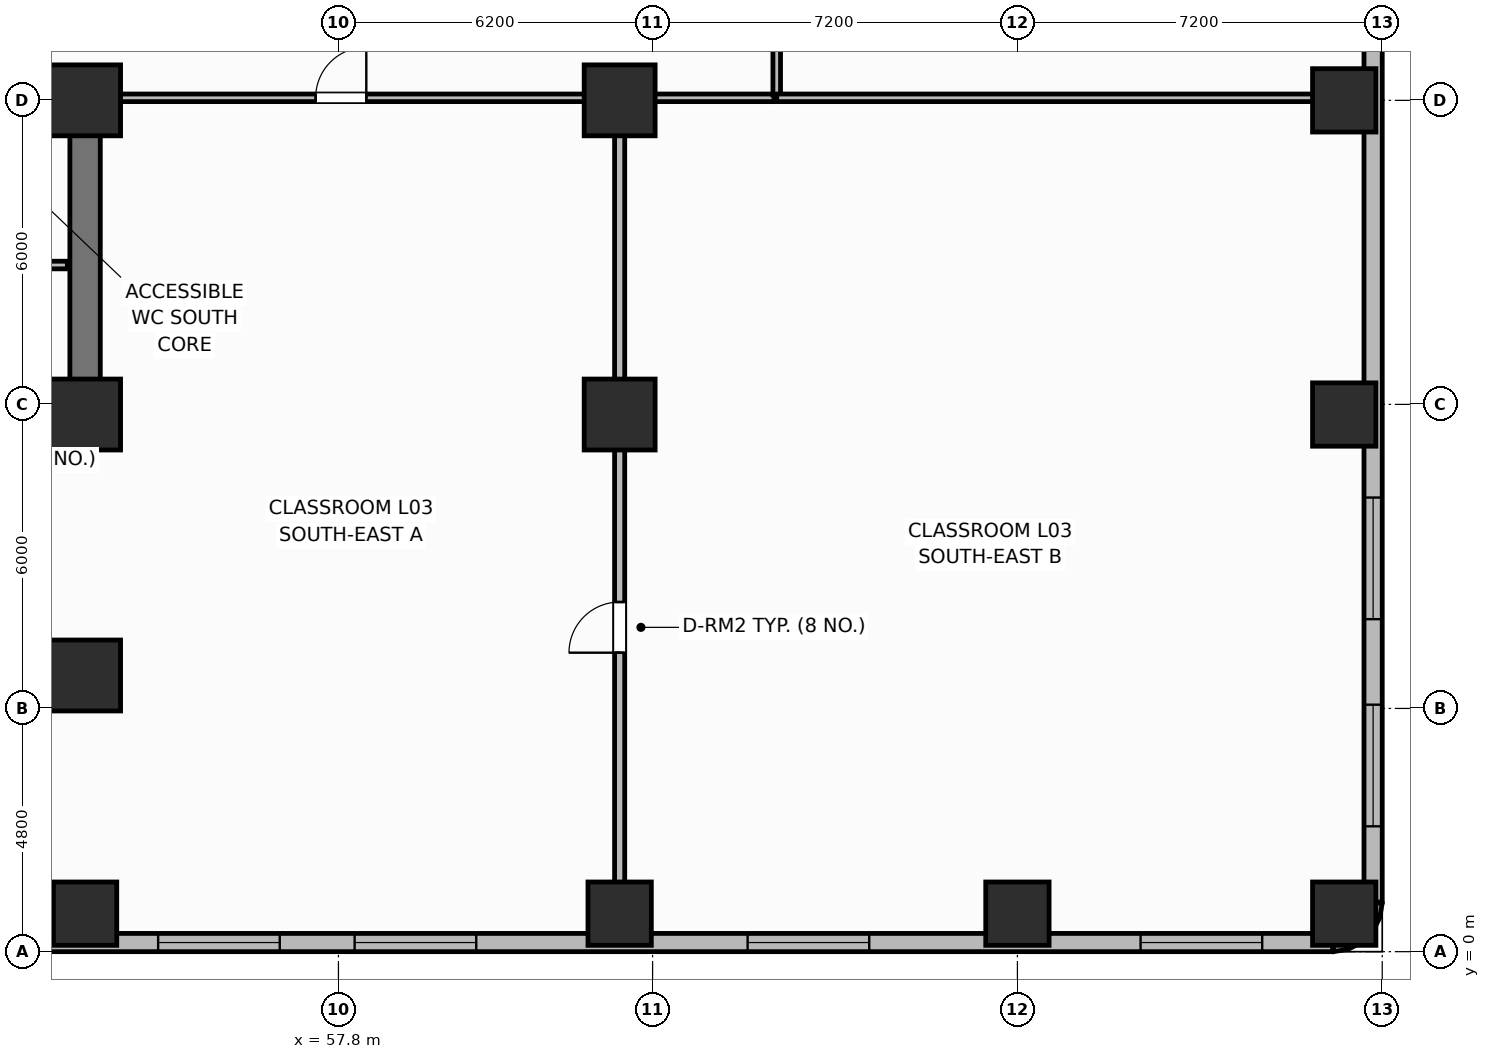
"""IFC4 building model, lengths in metres.
Left out: names, types, materials, properties, quantities, classifications, styles, units other than length and angle.
Written with IfcOpenShell. Run it as: python <this file> out.ifc"""

import sys

from ifc_helpers import new_model, si_unit, direction, frame, frame_2d, origin, origin_2d, place, context, subcontext, project, spatial, rectangle, extrude, element, fill, save


model = new_model("IFC4")
c1 = context("Model", 3, precision=1e-05, world=origin(), true_north=direction((0.0, 1.0)))
c2 = subcontext(c1, "Body", "Model", "MODEL_VIEW")
j1 = project(units=[si_unit("LENGTHUNIT", "METRE"), si_unit("PLANEANGLEUNIT", "RADIAN")], contexts=[c1])
p1 = place(None, origin())
s1 = spatial("IfcSite", under=j1, at=p1, CompositionType="ELEMENT")
p2 = place(p1, origin())
s2 = spatial("IfcBuilding", under=s1, at=p2, CompositionType="ELEMENT")
p3 = place(p2, frame((0.0, 0.0, 15.6)))
s3 = spatial("IfcBuildingStorey", under=s2, at=p3, CompositionType="ELEMENT", Elevation=15.6)
p4 = place(p3, frame((52.8, 10.6, 0.0), z_axis=(0.0, 0.0, 1.0), x_axis=(-1.0, 0.0, 0.0)))
e1 = element("IfcWall", 1, at=p4, inside=s3, PredefinedType="SHEAR", context=c2, shape_type="SweptSolid", body=[
    extrude(rectangle(XDim=27.2, YDim=0.6, at=frame_2d((13.6, 0.0))), origin(), (0.0, 0.0, 1.0), 4.5),
])
p5 = place(p3, frame((52.8, 10.9, 0.0), z_axis=(0.0, 0.0, 1.0), x_axis=(0.0, 1.0, 0.0)))
e2 = element("IfcWall", 2, at=p5, inside=s3, PredefinedType="SHEAR", context=c2, shape_type="SweptSolid", body=[
    extrude(rectangle(XDim=5.6, YDim=0.6, at=frame_2d((2.8, 0.0))), origin(), (0.0, 0.0, 1.0), 4.5),
])
p6 = place(p3, frame((25.6, 16.8, 0.0), z_axis=(0.0, 0.0, 1.0), x_axis=(1.0, 0.0, 0.0)))
e3 = element("IfcWall", 3, at=p6, inside=s3, PredefinedType="SHEAR", context=c2, shape_type="SweptSolid", body=[
    extrude(rectangle(XDim=27.2, YDim=0.6, at=frame_2d((13.6, 0.0))), origin(), (0.0, 0.0, 1.0), 4.5),
])
p7 = place(p6, frame((1.7, 0.0, 0.0)))
e4 = element("IfcOpeningElement", 4, at=p7, cuts=e3, PredefinedType="OPENING", context=c2, shape_type="SweptSolid", body=[
    extrude(rectangle(XDim=1.1, YDim=2.15, at=frame_2d((0.55, 1.075))), frame((0.0, 0.31, 0.0), z_axis=(0.0, -1.0, 0.0), x_axis=(1.0, 0.0, 0.0)), (0.0, 0.0, 1.0), 0.62),
])
p8 = place(p6, frame((4.45, 0.0, 0.0)))
e5 = element("IfcOpeningElement", 5, at=p8, cuts=e3, PredefinedType="OPENING", context=c2, shape_type="SweptSolid", body=[
    extrude(rectangle(XDim=0.85, YDim=2.1, at=frame_2d((0.425, 1.05))), frame((0.0, 0.31, 0.0), z_axis=(0.0, -1.0, 0.0), x_axis=(1.0, 0.0, 0.0)), (0.0, 0.0, 1.0), 0.62),
])
p9 = place(p6, frame((6.5, 0.0, 0.0)))
e6 = element("IfcOpeningElement", 6, at=p9, cuts=e3, PredefinedType="OPENING", context=c2, shape_type="SweptSolid", body=[
    extrude(rectangle(XDim=0.85, YDim=2.1, at=frame_2d((0.425, 1.05))), frame((0.0, 0.31, 0.0), z_axis=(0.0, -1.0, 0.0), x_axis=(1.0, 0.0, 0.0)), (0.0, 0.0, 1.0), 0.62),
])
p10 = place(p6, frame((13.0, 0.0, 0.0)))
e7 = element("IfcOpeningElement", 7, at=p10, cuts=e3, PredefinedType="OPENING", context=c2, shape_type="SweptSolid", body=[
    extrude(rectangle(XDim=1.2, YDim=2.15, at=frame_2d((0.6, 1.075))), frame((0.0, 0.31, 0.0), z_axis=(0.0, -1.0, 0.0), x_axis=(1.0, 0.0, 0.0)), (0.0, 0.0, 1.0), 0.62),
])
p11 = place(p6, frame((20.4, 0.0, 0.0)))
e8 = element("IfcOpeningElement", 8, at=p11, cuts=e3, PredefinedType="OPENING", context=c2, shape_type="SweptSolid", body=[
    extrude(rectangle(XDim=1.3, YDim=2.2, at=frame_2d((0.65, 1.1))), frame((0.0, 0.31, 0.0), z_axis=(0.0, -1.0, 0.0), x_axis=(1.0, 0.0, 0.0)), (0.0, 0.0, 1.0), 0.62),
])
p12 = place(p6, frame((24.65, 0.0, 0.0)))
e9 = element("IfcOpeningElement", 9, at=p12, cuts=e3, PredefinedType="OPENING", context=c2, shape_type="SweptSolid", body=[
    extrude(rectangle(XDim=0.85, YDim=2.1, at=frame_2d((0.425, 1.05))), frame((0.0, 0.31, 0.0), z_axis=(0.0, -1.0, 0.0), x_axis=(1.0, 0.0, 0.0)), (0.0, 0.0, 1.0), 0.62),
])
for number, where, z_axis, x_axis in (
    (10, (52.8, 10.6, 0.0), (0.0, 0.0, 1.0), (1.0, 0.0, 0.0)),
    (11, (52.8, 16.8, 0.0), (0.0, 0.0, 1.0), (1.0, 0.0, 0.0)),
):
    element("IfcColumn", number, at=place(p3, frame(where, z_axis=z_axis, x_axis=x_axis)), inside=s3, PredefinedType="COLUMN", context=c2, shape_type="SweptSolid", body=[
        extrude(rectangle(XDim=1.4, YDim=1.4, at=origin_2d()), origin(), (0.0, 0.0, 1.0), 4.5),
    ])
for number, where, z_axis, x_axis in (
    (12, (52.8, 0.75, 0.0), (0.0, 0.0, 1.0), (1.0, 0.0, 0.0)),
    (13, (63.35, 0.75, 0.0), (0.0, 0.0, 1.0), (1.0, 0.0, 0.0)),
    (14, (71.2, 0.75, 0.0), (0.0, 0.0, 1.0), (1.0, 0.0, 0.0)),
    (15, (77.65, 0.75, 0.0), (0.0, 0.0, 1.0), (1.0, 0.0, 0.0)),
    (16, (77.65, 10.6, 0.0), (0.0, 0.0, 1.0), (1.0, 0.0, 0.0)),
    (17, (77.65, 16.8, 0.0), (0.0, 0.0, 1.0), (1.0, 0.0, 0.0)),
):
    element("IfcColumn", number, at=place(p3, frame(where, z_axis=z_axis, x_axis=x_axis)), inside=s3, PredefinedType="COLUMN", context=c2, shape_type="SweptSolid", body=[
        extrude(rectangle(XDim=1.25, YDim=1.25, at=origin_2d()), origin(), (0.0, 0.0, 1.0), 4.5),
    ])
for number, where, z_axis, x_axis in (
    (18, (52.8, 5.45, 0.0), (0.0, 0.0, 1.0), (1.0, 0.0, 0.0)),
    (19, (63.35, 10.6, 0.0), (0.0, 0.0, 1.0), (1.0, 0.0, 0.0)),
    (20, (63.35, 16.8, 0.0), (0.0, 0.0, 1.0), (1.0, 0.0, 0.0)),
):
    element("IfcColumn", number, at=place(p3, frame(where, z_axis=z_axis, x_axis=x_axis)), inside=s3, PredefinedType="COLUMN", context=c2, shape_type="SweptSolid", body=[
        extrude(rectangle(XDim=1.4, YDim=1.4, at=origin_2d()), origin(), (0.0, 0.0, 1.0), 4.5),
    ])
p13 = place(p3, frame((21.83, 0.18, 0.0), z_axis=(0.0, 0.0, 1.0), x_axis=(1.0, 0.0, 0.0)))
e21 = element("IfcWall", 21, at=p13, inside=s3, PredefinedType="SOLIDWALL", context=c2, shape_type="SweptSolid", body=[
    extrude(rectangle(XDim=55.59, YDim=0.36, at=frame_2d((27.795, 0.0))), origin(), (0.0, 0.0, 1.0), 3.48),
])
p14 = place(p13, frame((5.267, 0.0, 0.85)))
e22 = element("IfcOpeningElement", 22, at=p14, cuts=e21, PredefinedType="OPENING", context=c2, shape_type="SweptSolid", body=[
    extrude(rectangle(XDim=2.4, YDim=2.25, at=frame_2d((1.2, 1.125))), frame((0.0, 0.19, 0.0), z_axis=(0.0, -1.0, 0.0), x_axis=(1.0, 0.0, 0.0)), (0.0, 0.0, 1.0), 0.38),
])
p15 = place(p13, frame((9.145, 0.0, 0.85)))
e23 = element("IfcOpeningElement", 23, at=p15, cuts=e21, PredefinedType="OPENING", context=c2, shape_type="SweptSolid", body=[
    extrude(rectangle(XDim=2.4, YDim=2.25, at=frame_2d((1.2, 1.125))), frame((0.0, 0.19, 0.0), z_axis=(0.0, -1.0, 0.0), x_axis=(1.0, 0.0, 0.0)), (0.0, 0.0, 1.0), 0.38),
])
p16 = place(p13, frame((13.022, 0.0, 0.85)))
e24 = element("IfcOpeningElement", 24, at=p16, cuts=e21, PredefinedType="OPENING", context=c2, shape_type="SweptSolid", body=[
    extrude(rectangle(XDim=2.4, YDim=2.25, at=frame_2d((1.2, 1.125))), frame((0.0, 0.19, 0.0), z_axis=(0.0, -1.0, 0.0), x_axis=(1.0, 0.0, 0.0)), (0.0, 0.0, 1.0), 0.38),
])
p17 = place(p13, frame((20.778, 0.0, 0.85)))
e25 = element("IfcOpeningElement", 25, at=p17, cuts=e21, PredefinedType="OPENING", context=c2, shape_type="SweptSolid", body=[
    extrude(rectangle(XDim=2.4, YDim=2.25, at=frame_2d((1.2, 1.125))), frame((0.0, 0.19, 0.0), z_axis=(0.0, -1.0, 0.0), x_axis=(1.0, 0.0, 0.0)), (0.0, 0.0, 1.0), 0.38),
])
p18 = place(p13, frame((24.656, 0.0, 0.85)))
e26 = element("IfcOpeningElement", 26, at=p18, cuts=e21, PredefinedType="OPENING", context=c2, shape_type="SweptSolid", body=[
    extrude(rectangle(XDim=2.4, YDim=2.25, at=frame_2d((1.2, 1.125))), frame((0.0, 0.19, 0.0), z_axis=(0.0, -1.0, 0.0), x_axis=(1.0, 0.0, 0.0)), (0.0, 0.0, 1.0), 0.38),
])
p19 = place(p13, frame((32.412, 0.0, 0.85)))
e27 = element("IfcOpeningElement", 27, at=p19, cuts=e21, PredefinedType="OPENING", context=c2, shape_type="SweptSolid", body=[
    extrude(rectangle(XDim=2.4, YDim=2.25, at=frame_2d((1.2, 1.125))), frame((0.0, 0.19, 0.0), z_axis=(0.0, -1.0, 0.0), x_axis=(1.0, 0.0, 0.0)), (0.0, 0.0, 1.0), 0.38),
])
p20 = place(p13, frame((36.29, 0.0, 0.85)))
e28 = element("IfcOpeningElement", 28, at=p20, cuts=e21, PredefinedType="OPENING", context=c2, shape_type="SweptSolid", body=[
    extrude(rectangle(XDim=2.4, YDim=2.25, at=frame_2d((1.2, 1.125))), frame((0.0, 0.19, 0.0), z_axis=(0.0, -1.0, 0.0), x_axis=(1.0, 0.0, 0.0)), (0.0, 0.0, 1.0), 0.38),
])
p21 = place(p13, frame((44.045, 0.0, 0.85)))
e29 = element("IfcOpeningElement", 29, at=p21, cuts=e21, PredefinedType="OPENING", context=c2, shape_type="SweptSolid", body=[
    extrude(rectangle(XDim=2.4, YDim=2.25, at=frame_2d((1.2, 1.125))), frame((0.0, 0.19, 0.0), z_axis=(0.0, -1.0, 0.0), x_axis=(1.0, 0.0, 0.0)), (0.0, 0.0, 1.0), 0.38),
])
p22 = place(p13, frame((51.801, 0.0, 0.85)))
e30 = element("IfcOpeningElement", 30, at=p22, cuts=e21, PredefinedType="OPENING", context=c2, shape_type="SweptSolid", body=[
    extrude(rectangle(XDim=2.4, YDim=2.25, at=frame_2d((1.2, 1.125))), frame((0.0, 0.19, 0.0), z_axis=(0.0, -1.0, 0.0), x_axis=(1.0, 0.0, 0.0)), (0.0, 0.0, 1.0), 0.38),
])
p23 = place(p3, frame((77.42, 0.18, 0.0), z_axis=(0.0, 0.0, 1.0), x_axis=(0.987604361038, 0.156963773077, 0.0)))
e31 = element("IfcWall", 31, at=p23, inside=s3, PredefinedType="SOLIDWALL", context=c2, shape_type="SweptSolid", body=[
    extrude(rectangle(XDim=0.25, YDim=0.36, at=frame_2d((0.125, 0.0))), origin(), (0.0, 0.0, 1.0), 3.48),
])
for number, where, z_axis, x_axis in (
    (32, (77.667, 0.219, 0.0), (0.0, 0.0, 1.0), (0.891, 0.454, 0.0)),
    (33, (77.89, 0.333, 0.0), (0.0, 0.0, 1.0), (0.707, 0.707, 0.0)),
):
    element("IfcWall", number, at=place(p3, frame(where, z_axis=z_axis, x_axis=x_axis)), inside=s3, PredefinedType="SOLIDWALL", context=c2, shape_type="SweptSolid", body=[
        extrude(rectangle(XDim=0.25, YDim=0.36, at=frame_2d((0.125, 0.0))), origin(), (0.0, 0.0, 1.0), 3.48),
    ])
p24 = place(p3, frame((78.067, 0.51, 0.0), z_axis=(0.0, 0.0, 1.0), x_axis=(0.454217786225, 0.89089067942, 0.0)))
e34 = element("IfcWall", 34, at=p24, inside=s3, PredefinedType="SOLIDWALL", context=c2, shape_type="SweptSolid", body=[
    extrude(rectangle(XDim=0.25, YDim=0.36, at=frame_2d((0.125, 0.0))), origin(), (0.0, 0.0, 1.0), 3.48),
])
p25 = place(p3, frame((78.181, 0.733, 0.0), z_axis=(0.0, 0.0, 1.0), x_axis=(0.156163049852, 0.987731290312, 0.0)))
e35 = element("IfcWall", 35, at=p25, inside=s3, PredefinedType="SOLIDWALL", context=c2, shape_type="SweptSolid", body=[
    extrude(rectangle(XDim=0.25, YDim=0.36, at=frame_2d((0.125, 0.0))), origin(), (0.0, 0.0, 1.0), 3.48),
])
p26 = place(p3, frame((78.22, 0.98, 0.0), z_axis=(0.0, 0.0, 1.0), x_axis=(0.0, 1.0, 0.0)))
e36 = element("IfcWall", 36, at=p26, inside=s3, PredefinedType="SOLIDWALL", context=c2, shape_type="SweptSolid", body=[
    extrude(rectangle(XDim=54.44, YDim=0.36, at=frame_2d((27.22, 0.0))), origin(), (0.0, 0.0, 1.0), 3.48),
])
p27 = place(p26, frame((1.494, 0.0, 0.85)))
e37 = element("IfcOpeningElement", 37, at=p27, cuts=e36, PredefinedType="OPENING", context=c2, shape_type="SweptSolid", body=[
    extrude(rectangle(XDim=2.4, YDim=2.25, at=frame_2d((1.2, 1.125))), frame((0.0, 0.19, 0.0), z_axis=(0.0, -1.0, 0.0), x_axis=(1.0, 0.0, 0.0)), (0.0, 0.0, 1.0), 0.38),
])
p28 = place(p26, frame((5.582, 0.0, 0.85)))
e38 = element("IfcOpeningElement", 38, at=p28, cuts=e36, PredefinedType="OPENING", context=c2, shape_type="SweptSolid", body=[
    extrude(rectangle(XDim=2.4, YDim=2.25, at=frame_2d((1.2, 1.125))), frame((0.0, 0.19, 0.0), z_axis=(0.0, -1.0, 0.0), x_axis=(1.0, 0.0, 0.0)), (0.0, 0.0, 1.0), 0.38),
])
p29 = place(p26, frame((17.844, 0.0, 0.85)))
e39 = element("IfcOpeningElement", 39, at=p29, cuts=e36, PredefinedType="OPENING", context=c2, shape_type="SweptSolid", body=[
    extrude(rectangle(XDim=2.4, YDim=2.25, at=frame_2d((1.2, 1.125))), frame((0.0, 0.19, 0.0), z_axis=(0.0, -1.0, 0.0), x_axis=(1.0, 0.0, 0.0)), (0.0, 0.0, 1.0), 0.38),
])
p30 = place(p26, frame((21.932, 0.0, 0.85)))
e40 = element("IfcOpeningElement", 40, at=p30, cuts=e36, PredefinedType="OPENING", context=c2, shape_type="SweptSolid", body=[
    extrude(rectangle(XDim=2.4, YDim=2.25, at=frame_2d((1.2, 1.125))), frame((0.0, 0.19, 0.0), z_axis=(0.0, -1.0, 0.0), x_axis=(1.0, 0.0, 0.0)), (0.0, 0.0, 1.0), 0.38),
])
p31 = place(p26, frame((30.108, 0.0, 0.85)))
e41 = element("IfcOpeningElement", 41, at=p31, cuts=e36, PredefinedType="OPENING", context=c2, shape_type="SweptSolid", body=[
    extrude(rectangle(XDim=2.4, YDim=2.25, at=frame_2d((1.2, 1.125))), frame((0.0, 0.19, 0.0), z_axis=(0.0, -1.0, 0.0), x_axis=(1.0, 0.0, 0.0)), (0.0, 0.0, 1.0), 0.38),
])
p32 = place(p26, frame((34.195, 0.0, 0.85)))
e42 = element("IfcOpeningElement", 42, at=p32, cuts=e36, PredefinedType="OPENING", context=c2, shape_type="SweptSolid", body=[
    extrude(rectangle(XDim=2.4, YDim=2.25, at=frame_2d((1.2, 1.125))), frame((0.0, 0.19, 0.0), z_axis=(0.0, -1.0, 0.0), x_axis=(1.0, 0.0, 0.0)), (0.0, 0.0, 1.0), 0.38),
])
p33 = place(p26, frame((46.458, 0.0, 0.85)))
e43 = element("IfcOpeningElement", 43, at=p33, cuts=e36, PredefinedType="OPENING", context=c2, shape_type="SweptSolid", body=[
    extrude(rectangle(XDim=2.4, YDim=2.25, at=frame_2d((1.2, 1.125))), frame((0.0, 0.19, 0.0), z_axis=(0.0, -1.0, 0.0), x_axis=(1.0, 0.0, 0.0)), (0.0, 0.0, 1.0), 0.38),
])
p34 = place(p26, frame((50.546, 0.0, 0.85)))
e44 = element("IfcOpeningElement", 44, at=p34, cuts=e36, PredefinedType="OPENING", context=c2, shape_type="SweptSolid", body=[
    extrude(rectangle(XDim=2.4, YDim=2.25, at=frame_2d((1.2, 1.125))), frame((0.0, 0.19, 0.0), z_axis=(0.0, -1.0, 0.0), x_axis=(1.0, 0.0, 0.0)), (0.0, 0.0, 1.0), 0.38),
])
p35 = place(p3, frame((49.6, 13.55, 0.0), z_axis=(0.0, 0.0, 1.0), x_axis=(1.0, 0.0, 0.0)))
e45 = element("IfcWall", 45, at=p35, inside=s3, PredefinedType="PARTITIONING", context=c2, shape_type="SweptSolid", body=[
    extrude(rectangle(XDim=2.85, YDim=0.15, at=frame_2d((1.425, 0.0))), origin(), (0.0, 0.0, 1.0), 3.42),
])
p36 = place(p35, frame((0.9, 0.0, 0.0)))
e46 = element("IfcOpeningElement", 46, at=p36, cuts=e45, PredefinedType="OPENING", context=c2, shape_type="SweptSolid", body=[
    extrude(rectangle(XDim=0.85, YDim=2.1, at=frame_2d((0.425, 1.05))), frame((0.0, 0.085, 0.0), z_axis=(0.0, -1.0, 0.0), x_axis=(1.0, 0.0, 0.0)), (0.0, 0.0, 1.0), 0.17),
])
p37 = place(p3, frame((63.35, 0.4, 0.0), z_axis=(0.0, 0.0, 1.0), x_axis=(0.0, 1.0, 0.0)))
e47 = element("IfcWall", 47, at=p37, inside=s3, PredefinedType="PARTITIONING", context=c2, shape_type="SweptSolid", body=[
    extrude(rectangle(XDim=16.4, YDim=0.2, at=frame_2d((8.2, 0.0))), origin(), (0.0, 0.0, 1.0), 3.42),
])
p38 = place(p37, frame((5.5, 0.0, 0.0)))
e48 = element("IfcOpeningElement", 48, at=p38, cuts=e47, PredefinedType="OPENING", context=c2, shape_type="SweptSolid", body=[
    extrude(rectangle(XDim=1.0, YDim=2.15, at=frame_2d((0.5, 1.075))), frame((0.0, 0.11, 0.0), z_axis=(0.0, -1.0, 0.0), x_axis=(1.0, 0.0, 0.0)), (0.0, 0.0, 1.0), 0.22),
])
p39 = place(p3, frame((53.15, 16.85, 0.0), z_axis=(0.0, 0.0, 1.0), x_axis=(1.0, 0.0, 0.0)))
e49 = element("IfcWall", 49, at=p39, inside=s3, PredefinedType="PARTITIONING", context=c2, shape_type="SweptSolid", body=[
    extrude(rectangle(XDim=13.25, YDim=0.15, at=frame_2d((6.625, 0.0))), origin(), (0.0, 0.0, 1.0), 3.42),
])
p40 = place(p39, frame((4.2, 0.0, 0.0)))
e50 = element("IfcOpeningElement", 50, at=p40, cuts=e49, PredefinedType="OPENING", context=c2, shape_type="SweptSolid", body=[
    extrude(rectangle(XDim=1.0, YDim=2.15, at=frame_2d((0.5, 1.075))), frame((0.0, 0.085, 0.0), z_axis=(0.0, -1.0, 0.0), x_axis=(1.0, 0.0, 0.0)), (0.0, 0.0, 1.0), 0.17),
])
p41 = place(p3, frame((66.45, 16.9, 0.0), z_axis=(0.0, 0.0, 1.0), x_axis=(0.0, 1.0, 0.0)))
e51 = element("IfcWall", 51, at=p41, inside=s3, PredefinedType="PARTITIONING", context=c2, shape_type="SweptSolid", body=[
    extrude(rectangle(XDim=5.65, YDim=0.15, at=frame_2d((2.825, 0.0))), origin(), (0.0, 0.0, 1.0), 3.42),
])
p42 = place(p41, frame((2.1, 0.0, 0.0)))
e52 = element("IfcOpeningElement", 52, at=p42, cuts=e51, PredefinedType="OPENING", context=c2, shape_type="SweptSolid", body=[
    extrude(rectangle(XDim=0.9, YDim=2.1, at=frame_2d((0.45, 1.05))), frame((0.0, 0.085, 0.0), z_axis=(0.0, -1.0, 0.0), x_axis=(1.0, 0.0, 0.0)), (0.0, 0.0, 1.0), 0.17),
])
p43 = place(p3, frame((66.45, 16.85, 0.0), z_axis=(0.0, 0.0, 1.0), x_axis=(1.0, 0.0, 0.0)))
e53 = element("IfcWall", 53, at=p43, inside=s3, PredefinedType="PARTITIONING", context=c2, shape_type="SweptSolid", body=[
    extrude(rectangle(XDim=11.55, YDim=0.15, at=frame_2d((5.775, 0.0))), origin(), (0.0, 0.0, 1.0), 3.42),
])
p44 = place(p19, origin())
e54 = element("IfcWindow", 54, at=p44, inside=s3, PartitioningType="SINGLE_PANEL", PredefinedType="WINDOW", context=c2, shape_type="SweptSolid", body=[
    extrude(rectangle(XDim=2.4, YDim=2.25, at=frame_2d((1.2, 1.125))), frame((0.0, 0.03, 0.0), z_axis=(0.0, -1.0, 0.0), x_axis=(1.0, 0.0, 0.0)), (0.0, 0.0, 1.0), 0.06),
])
fill(e27, e54)
p45 = place(p20, origin())
e55 = element("IfcWindow", 55, at=p45, inside=s3, PartitioningType="SINGLE_PANEL", PredefinedType="WINDOW", context=c2, shape_type="SweptSolid", body=[
    extrude(rectangle(XDim=2.4, YDim=2.25, at=frame_2d((1.2, 1.125))), frame((0.0, 0.03, 0.0), z_axis=(0.0, -1.0, 0.0), x_axis=(1.0, 0.0, 0.0)), (0.0, 0.0, 1.0), 0.06),
])
fill(e28, e55)
p46 = place(p21, origin())
e56 = element("IfcWindow", 56, at=p46, inside=s3, PartitioningType="SINGLE_PANEL", PredefinedType="WINDOW", context=c2, shape_type="SweptSolid", body=[
    extrude(rectangle(XDim=2.4, YDim=2.25, at=frame_2d((1.2, 1.125))), frame((0.0, 0.03, 0.0), z_axis=(0.0, -1.0, 0.0), x_axis=(1.0, 0.0, 0.0)), (0.0, 0.0, 1.0), 0.06),
])
fill(e29, e56)
p47 = place(p22, origin())
e57 = element("IfcWindow", 57, at=p47, inside=s3, PartitioningType="SINGLE_PANEL", PredefinedType="WINDOW", context=c2, shape_type="SweptSolid", body=[
    extrude(rectangle(XDim=2.4, YDim=2.25, at=frame_2d((1.2, 1.125))), frame((0.0, 0.03, 0.0), z_axis=(0.0, -1.0, 0.0), x_axis=(1.0, 0.0, 0.0)), (0.0, 0.0, 1.0), 0.06),
])
fill(e30, e57)
p48 = place(p27, origin())
e58 = element("IfcWindow", 58, at=p48, inside=s3, PartitioningType="SINGLE_PANEL", PredefinedType="WINDOW", context=c2, shape_type="SweptSolid", body=[
    extrude(rectangle(XDim=2.4, YDim=2.25, at=frame_2d((1.2, 1.125))), frame((0.0, 0.03, 0.0), z_axis=(0.0, -1.0, 0.0), x_axis=(1.0, 0.0, 0.0)), (0.0, 0.0, 1.0), 0.06),
])
fill(e37, e58)
p49 = place(p28, origin())
e59 = element("IfcWindow", 59, at=p49, inside=s3, PartitioningType="SINGLE_PANEL", PredefinedType="WINDOW", context=c2, shape_type="SweptSolid", body=[
    extrude(rectangle(XDim=2.4, YDim=2.25, at=frame_2d((1.2, 1.125))), frame((0.0, 0.03, 0.0), z_axis=(0.0, -1.0, 0.0), x_axis=(1.0, 0.0, 0.0)), (0.0, 0.0, 1.0), 0.06),
])
fill(e38, e59)
p50 = place(p38, origin())
e60 = element("IfcDoor", 60, at=p50, inside=s3, OperationType="SINGLE_SWING_LEFT", PredefinedType="DOOR", context=c2, shape_type="SweptSolid", body=[
    extrude(rectangle(XDim=1.0, YDim=2.15, at=frame_2d((0.5, 1.075))), frame((0.0, 0.025, 0.0), z_axis=(0.0, -1.0, 0.0), x_axis=(1.0, 0.0, 0.0)), (0.0, 0.0, 1.0), 0.05),
])
fill(e48, e60)
p51 = place(p40, origin())
e61 = element("IfcDoor", 61, at=p51, inside=s3, OperationType="SINGLE_SWING_RIGHT", PredefinedType="DOOR", context=c2, shape_type="SweptSolid", body=[
    extrude(rectangle(XDim=1.0, YDim=2.15, at=frame_2d((0.5, 1.075))), frame((0.0, 0.025, 0.0), z_axis=(0.0, -1.0, 0.0), x_axis=(1.0, 0.0, 0.0)), (0.0, 0.0, 1.0), 0.05),
])
fill(e50, e61)
save(model, sys.argv[1])
